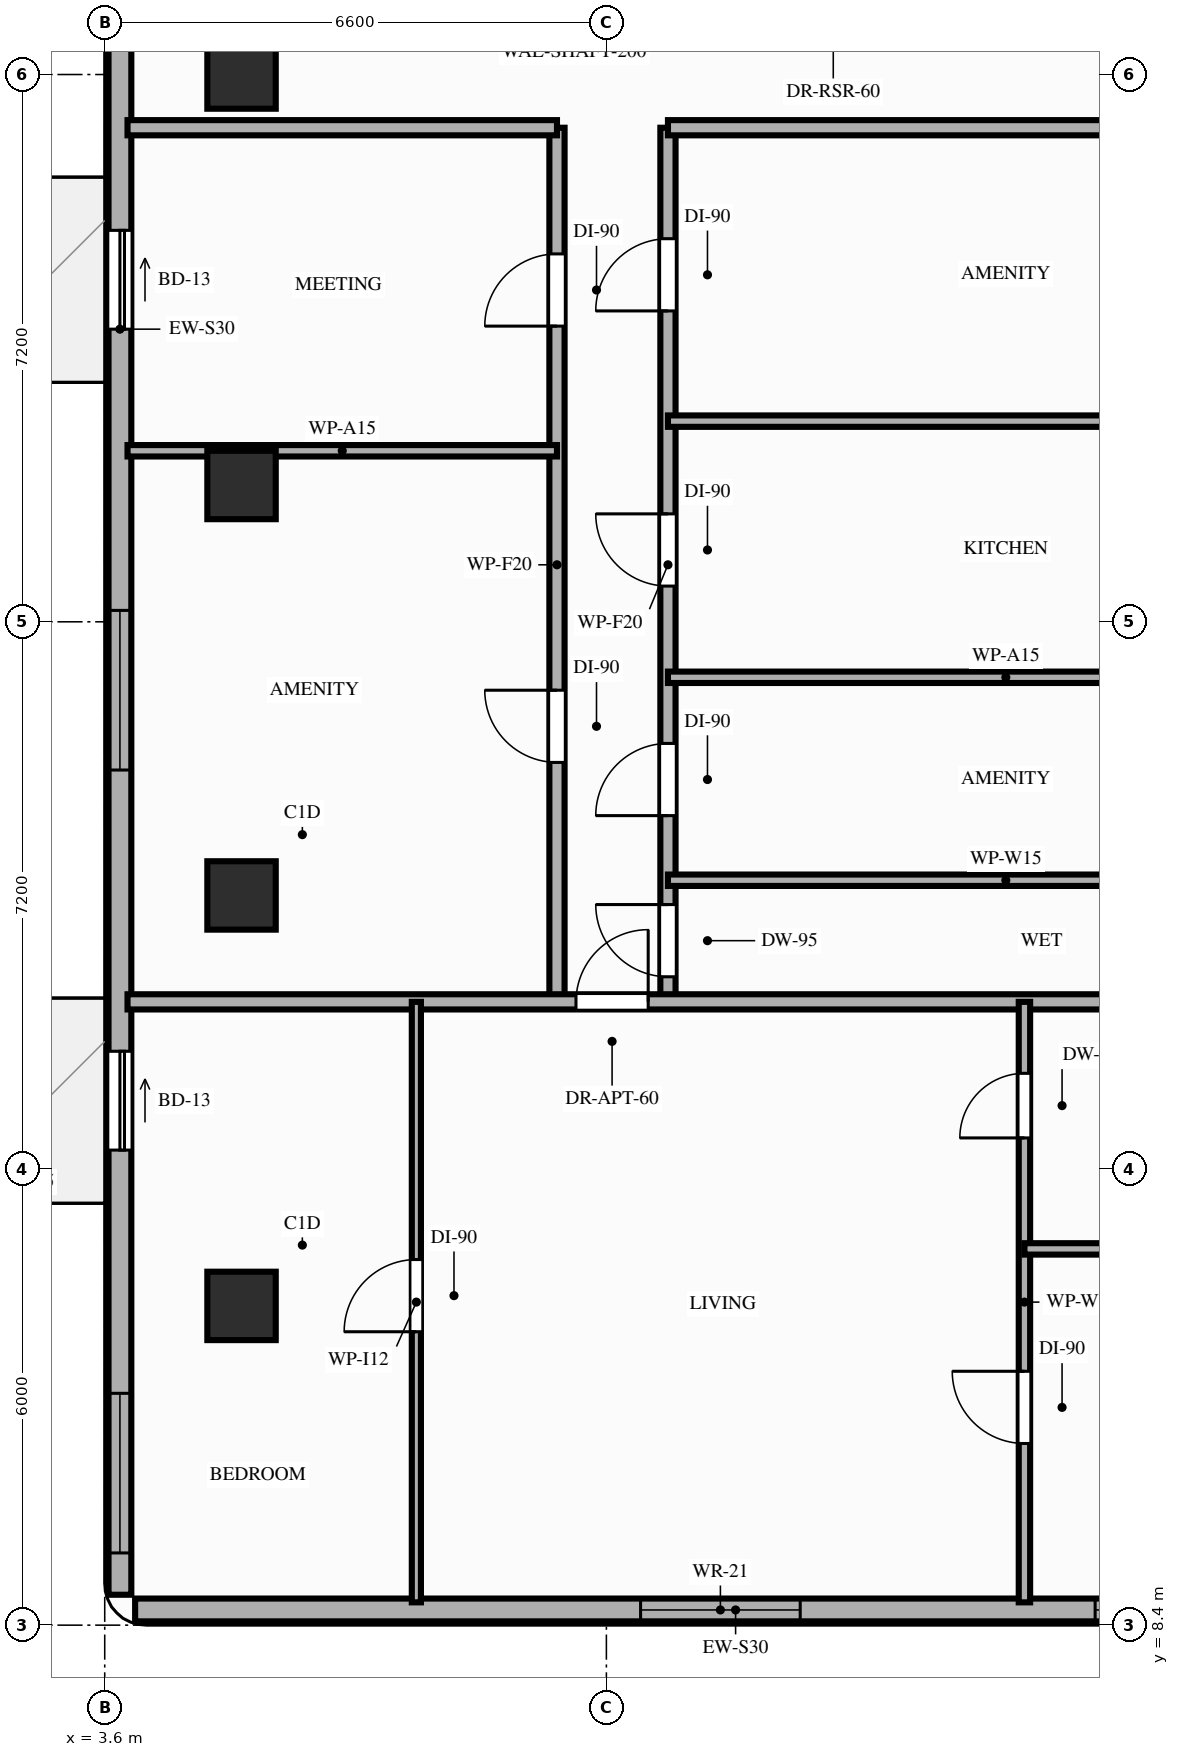
"""IFC4 building model, lengths in metres.
Left out: names, types, materials, properties, quantities, classifications, styles, units other than length and angle.
Written with IfcOpenShell. Run it as: python <this file> out.ifc"""

import sys

from ifc_helpers import new_model, si_unit, direction, frame, frame_2d, origin, origin_2d, place, context, subcontext, project, spatial, rectangle, extrude, element, fill, save


model = new_model("IFC4")
c1 = context("Model", 3, precision=1e-05, world=origin(), true_north=direction((0.0, 1.0)))
c2 = subcontext(c1, "Body", "Model", "MODEL_VIEW")
j1 = project(units=[si_unit("LENGTHUNIT", "METRE"), si_unit("PLANEANGLEUNIT", "RADIAN")], contexts=[c1])
p1 = place(None, origin())
s1 = spatial("IfcSite", under=j1, at=p1, CompositionType="ELEMENT")
p2 = place(p1, origin())
s2 = spatial("IfcBuilding", under=s1, at=p2, CompositionType="ELEMENT")
p3 = place(p2, frame((0.0, 0.0, 182.4)))
s3 = spatial("IfcBuildingStorey", under=s2, at=p3, CompositionType="ELEMENT", Elevation=182.4)
for number, where, z_axis, x_axis in (
    (1, (5.4, 12.6, 0.0), (0.0, 0.0, 1.0), (1.0, 0.0, 0.0)),
    (2, (5.4, 18.0, 0.0), (0.0, 0.0, 1.0), (1.0, 0.0, 0.0)),
    (3, (5.4, 23.4, 0.0), (0.0, 0.0, 1.0), (1.0, 0.0, 0.0)),
    (4, (5.4, 28.8, 0.0), (0.0, 0.0, 1.0), (1.0, 0.0, 0.0)),
):
    element("IfcColumn", number, at=place(p3, frame(where, z_axis=z_axis, x_axis=x_axis)), inside=s3, PredefinedType="COLUMN", context=c2, shape_type="SweptSolid", body=[
        extrude(rectangle(XDim=0.9, YDim=0.9, at=origin_2d()), origin(), (0.0, 0.0, 1.0), 3.2),
    ])
p4 = place(p3, frame((4.0, 8.6, 0.0), z_axis=(0.0, 0.0, 1.0), x_axis=(1.0, 0.0, 0.0)))
e5 = element("IfcWall", 5, at=p4, inside=s3, PredefinedType="STANDARD", context=c2, shape_type="SweptSolid", body=[
    extrude(rectangle(XDim=15.8, YDim=0.3, at=frame_2d((7.9, 0.0))), origin(), (0.0, 0.0, 1.0), 3.02),
])
p5 = place(p4, frame((6.65, 0.0, 0.85)))
e6 = element("IfcOpeningElement", 6, at=p5, cuts=e5, PredefinedType="OPENING", context=c2, shape_type="SweptSolid", body=[
    extrude(rectangle(XDim=2.1, YDim=1.8, at=frame_2d((1.05, 0.9))), frame((0.0, 0.16, 0.0), z_axis=(0.0, -1.0, 0.0), x_axis=(1.0, 0.0, 0.0)), (0.0, 0.0, 1.0), 0.32),
])
p6 = place(p4, frame((12.63, 0.0, 0.85)))
e7 = element("IfcOpeningElement", 7, at=p6, cuts=e5, PredefinedType="OPENING", context=c2, shape_type="SweptSolid", body=[
    extrude(rectangle(XDim=2.1, YDim=1.8, at=frame_2d((1.05, 0.9))), frame((0.0, 0.16, 0.0), z_axis=(0.0, -1.0, 0.0), x_axis=(1.0, 0.0, 0.0)), (0.0, 0.0, 1.0), 0.32),
])
p7 = place(p3, frame((3.8, 42.1, 0.0), z_axis=(0.0, 0.0, 1.0), x_axis=(0.0, -1.0, 0.0)))
e8 = element("IfcWall", 8, at=p7, inside=s3, PredefinedType="STANDARD", context=c2, shape_type="SweptSolid", body=[
    extrude(rectangle(XDim=33.3, YDim=0.3, at=frame_2d((16.65, 0.0))), origin(), (0.0, 0.0, 1.0), 2.71),
])
p8 = place(p7, frame((26.15, 0.0, 0.0)))
e9 = element("IfcOpeningElement", 9, at=p8, cuts=e8, PredefinedType="OPENING", context=c2, shape_type="SweptSolid", body=[
    extrude(rectangle(XDim=1.3, YDim=2.08, at=frame_2d((0.65, 1.04))), frame((0.0, 0.16, 0.0), z_axis=(0.0, -1.0, 0.0), x_axis=(1.0, 0.0, 0.0)), (0.0, 0.0, 1.0), 0.32),
])
p9 = place(p7, frame((15.35, 0.0, 0.0)))
e10 = element("IfcOpeningElement", 10, at=p9, cuts=e8, PredefinedType="OPENING", context=c2, shape_type="SweptSolid", body=[
    extrude(rectangle(XDim=1.3, YDim=2.08, at=frame_2d((0.65, 1.04))), frame((0.0, 0.16, 0.0), z_axis=(0.0, -1.0, 0.0), x_axis=(1.0, 0.0, 0.0)), (0.0, 0.0, 1.0), 0.32),
])
p10 = place(p7, frame((30.65, 0.0, 0.85)))
e11 = element("IfcOpeningElement", 11, at=p10, cuts=e8, PredefinedType="OPENING", context=c2, shape_type="SweptSolid", body=[
    extrude(rectangle(XDim=2.1, YDim=1.61, at=frame_2d((1.05, 0.805))), frame((0.0, 0.16, 0.0), z_axis=(0.0, -1.0, 0.0), x_axis=(1.0, 0.0, 0.0)), (0.0, 0.0, 1.0), 0.32),
])
p11 = place(p7, frame((20.35, 0.0, 0.85)))
e12 = element("IfcOpeningElement", 12, at=p11, cuts=e8, PredefinedType="OPENING", context=c2, shape_type="SweptSolid", body=[
    extrude(rectangle(XDim=2.1, YDim=1.61, at=frame_2d((1.05, 0.805))), frame((0.0, 0.16, 0.0), z_axis=(0.0, -1.0, 0.0), x_axis=(1.0, 0.0, 0.0)), (0.0, 0.0, 1.0), 0.32),
])
p12 = place(p7, frame((9.75, 0.0, 0.85)))
e13 = element("IfcOpeningElement", 13, at=p12, cuts=e8, PredefinedType="OPENING", context=c2, shape_type="SweptSolid", body=[
    extrude(rectangle(XDim=2.1, YDim=1.61, at=frame_2d((1.05, 0.805))), frame((0.0, 0.16, 0.0), z_axis=(0.0, -1.0, 0.0), x_axis=(1.0, 0.0, 0.0)), (0.0, 0.0, 1.0), 0.32),
])
p13 = place(p7, frame((3.65, 0.0, 0.85)))
e14 = element("IfcOpeningElement", 14, at=p13, cuts=e8, PredefinedType="OPENING", context=c2, shape_type="SweptSolid", body=[
    extrude(rectangle(XDim=2.1, YDim=1.61, at=frame_2d((1.05, 0.805))), frame((0.0, 0.16, 0.0), z_axis=(0.0, -1.0, 0.0), x_axis=(1.0, 0.0, 0.0)), (0.0, 0.0, 1.0), 0.32),
])
p14 = place(p3, frame((9.55, 16.6, 0.0), z_axis=(0.0, 0.0, 1.0), x_axis=(0.0, 1.0, 0.0)))
e15 = element("IfcWall", 15, at=p14, inside=s3, PredefinedType="PARTITIONING", context=c2, shape_type="SweptSolid", body=[
    extrude(rectangle(XDim=11.5, YDim=0.2, at=frame_2d((5.75, 0.0))), origin(), (0.0, 0.0, 1.0), 2.45),
])
p15 = place(p14, frame((3.15, 0.0, 0.0)))
e16 = element("IfcOpeningElement", 16, at=p15, cuts=e15, PredefinedType="OPENING", context=c2, shape_type="SweptSolid", body=[
    extrude(rectangle(XDim=0.95, YDim=2.15, at=frame_2d((0.475, 1.075))), frame((0.0, 0.11, 0.0), z_axis=(0.0, -1.0, 0.0), x_axis=(1.0, 0.0, 0.0)), (0.0, 0.0, 1.0), 0.22),
])
p16 = place(p14, frame((8.89, 0.0, 0.0)))
e17 = element("IfcOpeningElement", 17, at=p16, cuts=e15, PredefinedType="OPENING", context=c2, shape_type="SweptSolid", body=[
    extrude(rectangle(XDim=0.95, YDim=2.15, at=frame_2d((0.475, 1.075))), frame((0.0, 0.11, 0.0), z_axis=(0.0, -1.0, 0.0), x_axis=(1.0, 0.0, 0.0)), (0.0, 0.0, 1.0), 0.22),
])
p17 = place(p3, frame((11.01, 16.6, 0.0), z_axis=(0.0, 0.0, 1.0), x_axis=(0.0, 1.0, 0.0)))
e18 = element("IfcWall", 18, at=p17, inside=s3, PredefinedType="PARTITIONING", context=c2, shape_type="SweptSolid", body=[
    extrude(rectangle(XDim=11.5, YDim=0.2, at=frame_2d((5.75, 0.0))), origin(), (0.0, 0.0, 1.0), 2.45),
])
p18 = place(p17, frame((0.33, 0.0, 0.0)))
e19 = element("IfcOpeningElement", 19, at=p18, cuts=e18, PredefinedType="OPENING", context=c2, shape_type="SweptSolid", body=[
    extrude(rectangle(XDim=0.95, YDim=2.1, at=frame_2d((0.475, 1.05))), frame((0.0, 0.11, 0.0), z_axis=(0.0, -1.0, 0.0), x_axis=(1.0, 0.0, 0.0)), (0.0, 0.0, 1.0), 0.22),
])
p19 = place(p17, frame((2.45, 0.0, 0.0)))
e20 = element("IfcOpeningElement", 20, at=p19, cuts=e18, PredefinedType="OPENING", context=c2, shape_type="SweptSolid", body=[
    extrude(rectangle(XDim=0.95, YDim=2.15, at=frame_2d((0.475, 1.075))), frame((0.0, 0.11, 0.0), z_axis=(0.0, -1.0, 0.0), x_axis=(1.0, 0.0, 0.0)), (0.0, 0.0, 1.0), 0.22),
])
p20 = place(p17, frame((5.47, 0.0, 0.0)))
e21 = element("IfcOpeningElement", 21, at=p20, cuts=e18, PredefinedType="OPENING", context=c2, shape_type="SweptSolid", body=[
    extrude(rectangle(XDim=0.95, YDim=2.15, at=frame_2d((0.475, 1.075))), frame((0.0, 0.11, 0.0), z_axis=(0.0, -1.0, 0.0), x_axis=(1.0, 0.0, 0.0)), (0.0, 0.0, 1.0), 0.22),
])
p21 = place(p17, frame((9.09, 0.0, 0.0)))
e22 = element("IfcOpeningElement", 22, at=p21, cuts=e18, PredefinedType="OPENING", context=c2, shape_type="SweptSolid", body=[
    extrude(rectangle(XDim=0.95, YDim=2.15, at=frame_2d((0.475, 1.075))), frame((0.0, 0.11, 0.0), z_axis=(0.0, -1.0, 0.0), x_axis=(1.0, 0.0, 0.0)), (0.0, 0.0, 1.0), 0.22),
])
p22 = place(p3, frame((3.9, 16.6, 0.0), z_axis=(0.0, 0.0, 1.0), x_axis=(1.0, 0.0, 0.0)))
e23 = element("IfcWall", 23, at=p22, inside=s3, PredefinedType="PARTITIONING", context=c2, shape_type="SweptSolid", body=[
    extrude(rectangle(XDim=16.0, YDim=0.2, at=frame_2d((8.0, 0.0))), origin(), (0.0, 0.0, 1.0), 2.45),
])
p23 = place(p22, frame((5.9, 0.0, 0.0)))
e24 = element("IfcOpeningElement", 24, at=p23, cuts=e23, PredefinedType="OPENING", context=c2, shape_type="SweptSolid", body=[
    extrude(rectangle(XDim=0.95, YDim=2.15, at=frame_2d((0.475, 1.075))), frame((0.0, 0.11, 0.0), z_axis=(0.0, -1.0, 0.0), x_axis=(1.0, 0.0, 0.0)), (0.0, 0.0, 1.0), 0.22),
])
p24 = place(p3, frame((3.9, 28.1, 0.0), z_axis=(0.0, 0.0, 1.0), x_axis=(1.0, 0.0, 0.0)))
e25 = element("IfcWall", 25, at=p24, inside=s3, PredefinedType="PARTITIONING", context=c2, shape_type="SweptSolid", body=[
    extrude(rectangle(XDim=5.65, YDim=0.2, at=frame_2d((2.825, 0.0))), origin(), (0.0, 0.0, 1.0), 2.45),
])
p25 = place(p3, frame((11.01, 28.1, 0.0), z_axis=(0.0, 0.0, 1.0), x_axis=(1.0, 0.0, 0.0)))
e26 = element("IfcWall", 26, at=p25, inside=s3, PredefinedType="PARTITIONING", context=c2, shape_type="SweptSolid", body=[
    extrude(rectangle(XDim=8.89, YDim=0.2, at=frame_2d((4.445, 0.0))), origin(), (0.0, 0.0, 1.0), 2.45),
])
p26 = place(p3, frame((7.7, 8.7, 0.0), z_axis=(0.0, 0.0, 1.0), x_axis=(0.0, 1.0, 0.0)))
e27 = element("IfcWall", 27, at=p26, inside=s3, PredefinedType="PARTITIONING", context=c2, shape_type="SweptSolid", body=[
    extrude(rectangle(XDim=7.9, YDim=0.12, at=frame_2d((3.95, 0.0))), origin(), (0.0, 0.0, 1.0), 2.45),
])
p27 = place(p26, frame((3.56, 0.0, 0.0)))
e28 = element("IfcOpeningElement", 28, at=p27, cuts=e27, PredefinedType="OPENING", context=c2, shape_type="SweptSolid", body=[
    extrude(rectangle(XDim=0.95, YDim=2.15, at=frame_2d((0.475, 1.075))), frame((0.0, 0.07, 0.0), z_axis=(0.0, -1.0, 0.0), x_axis=(1.0, 0.0, 0.0)), (0.0, 0.0, 1.0), 0.14),
])
p28 = place(p3, frame((15.7, 8.7, 0.0), z_axis=(0.0, 0.0, 1.0), x_axis=(0.0, 1.0, 0.0)))
e29 = element("IfcWall", 29, at=p28, inside=s3, PredefinedType="PARTITIONING", context=c2, shape_type="SweptSolid", body=[
    extrude(rectangle(XDim=7.9, YDim=0.15, at=frame_2d((3.95, 0.0))), origin(), (0.0, 0.0, 1.0), 2.45),
])
p29 = place(p28, frame((2.09, 0.0, 0.0)))
e30 = element("IfcOpeningElement", 30, at=p29, cuts=e29, PredefinedType="OPENING", context=c2, shape_type="SweptSolid", body=[
    extrude(rectangle(XDim=0.95, YDim=2.15, at=frame_2d((0.475, 1.075))), frame((0.0, 0.085, 0.0), z_axis=(0.0, -1.0, 0.0), x_axis=(1.0, 0.0, 0.0)), (0.0, 0.0, 1.0), 0.17),
])
p30 = place(p28, frame((6.11, 0.0, 0.0)))
e31 = element("IfcOpeningElement", 31, at=p30, cuts=e29, PredefinedType="OPENING", context=c2, shape_type="SweptSolid", body=[
    extrude(rectangle(XDim=0.85, YDim=2.1, at=frame_2d((0.425, 1.05))), frame((0.0, 0.085, 0.0), z_axis=(0.0, -1.0, 0.0), x_axis=(1.0, 0.0, 0.0)), (0.0, 0.0, 1.0), 0.17),
])
p31 = place(p3, frame((15.7, 13.35, 0.0), z_axis=(0.0, 0.0, 1.0), x_axis=(1.0, 0.0, 0.0)))
e32 = element("IfcWall", 32, at=p31, inside=s3, PredefinedType="PARTITIONING", context=c2, shape_type="SweptSolid", body=[
    extrude(rectangle(XDim=4.2, YDim=0.15, at=frame_2d((2.1, 0.0))), origin(), (0.0, 0.0, 1.0), 2.45),
])
p32 = place(p3, frame((3.9, 23.85, 0.0), z_axis=(0.0, 0.0, 1.0), x_axis=(1.0, 0.0, 0.0)))
e33 = element("IfcWall", 33, at=p32, inside=s3, PredefinedType="PARTITIONING", context=c2, shape_type="SweptSolid", body=[
    extrude(rectangle(XDim=5.65, YDim=0.15, at=frame_2d((2.825, 0.0))), origin(), (0.0, 0.0, 1.0), 2.45),
])
for number, where, z_axis, x_axis in (
    (34, (11.01, 18.2, 0.0), (0.0, 0.0, 1.0), (1.0, 0.0, 0.0)),
    (35, (11.01, 20.87, 0.0), (0.0, 0.0, 1.0), (1.0, 0.0, 0.0)),
    (36, (11.01, 24.24, 0.0), (0.0, 0.0, 1.0), (1.0, 0.0, 0.0)),
):
    element("IfcWall", number, at=place(p3, frame(where, z_axis=z_axis, x_axis=x_axis)), inside=s3, PredefinedType="PARTITIONING", context=c2, shape_type="SweptSolid", body=[
        extrude(rectangle(XDim=8.89, YDim=0.15, at=frame_2d((4.445, 0.0))), origin(), (0.0, 0.0, 1.0), 2.45),
    ])
p33 = place(p8, origin())
e37 = element("IfcDoor", 37, at=p33, inside=s3, OperationType="SLIDING_TO_LEFT", PredefinedType="DOOR", context=c2, shape_type="SweptSolid", body=[
    extrude(rectangle(XDim=1.3, YDim=2.08, at=frame_2d((0.65, 1.04))), frame((0.0, 0.025, 0.0), z_axis=(0.0, -1.0, 0.0), x_axis=(1.0, 0.0, 0.0)), (0.0, 0.0, 1.0), 0.05),
])
fill(e9, e37)
p34 = place(p9, origin())
e38 = element("IfcDoor", 38, at=p34, inside=s3, OperationType="SLIDING_TO_LEFT", PredefinedType="DOOR", context=c2, shape_type="SweptSolid", body=[
    extrude(rectangle(XDim=1.3, YDim=2.08, at=frame_2d((0.65, 1.04))), frame((0.0, 0.025, 0.0), z_axis=(0.0, -1.0, 0.0), x_axis=(1.0, 0.0, 0.0)), (0.0, 0.0, 1.0), 0.05),
])
fill(e10, e38)
p35 = place(p5, origin())
e39 = element("IfcWindow", 39, at=p35, inside=s3, PartitioningType="SINGLE_PANEL", PredefinedType="WINDOW", context=c2, shape_type="SweptSolid", body=[
    extrude(rectangle(XDim=2.1, YDim=1.8, at=frame_2d((1.05, 0.9))), frame((0.0, 0.03, 0.0), z_axis=(0.0, -1.0, 0.0), x_axis=(1.0, 0.0, 0.0)), (0.0, 0.0, 1.0), 0.06),
])
fill(e6, e39)
p36 = place(p6, origin())
e40 = element("IfcWindow", 40, at=p36, inside=s3, PartitioningType="SINGLE_PANEL", PredefinedType="WINDOW", context=c2, shape_type="SweptSolid", body=[
    extrude(rectangle(XDim=2.1, YDim=1.8, at=frame_2d((1.05, 0.9))), frame((0.0, 0.03, 0.0), z_axis=(0.0, -1.0, 0.0), x_axis=(1.0, 0.0, 0.0)), (0.0, 0.0, 1.0), 0.06),
])
fill(e7, e40)
p37 = place(p10, origin())
e41 = element("IfcWindow", 41, at=p37, inside=s3, PartitioningType="SINGLE_PANEL", PredefinedType="WINDOW", context=c2, shape_type="SweptSolid", body=[
    extrude(rectangle(XDim=2.1, YDim=1.61, at=frame_2d((1.05, 0.805))), frame((0.0, 0.03, 0.0), z_axis=(0.0, -1.0, 0.0), x_axis=(1.0, 0.0, 0.0)), (0.0, 0.0, 1.0), 0.06),
])
fill(e11, e41)
p38 = place(p11, origin())
e42 = element("IfcWindow", 42, at=p38, inside=s3, PartitioningType="SINGLE_PANEL", PredefinedType="WINDOW", context=c2, shape_type="SweptSolid", body=[
    extrude(rectangle(XDim=2.1, YDim=1.61, at=frame_2d((1.05, 0.805))), frame((0.0, 0.03, 0.0), z_axis=(0.0, -1.0, 0.0), x_axis=(1.0, 0.0, 0.0)), (0.0, 0.0, 1.0), 0.06),
])
fill(e12, e42)
p39 = place(p23, origin())
e43 = element("IfcDoor", 43, at=p39, inside=s3, OperationType="SINGLE_SWING_RIGHT", PredefinedType="DOOR", context=c2, shape_type="SweptSolid", body=[
    extrude(rectangle(XDim=0.95, YDim=2.15, at=frame_2d((0.475, 1.075))), frame((0.0, 0.025, 0.0), z_axis=(0.0, -1.0, 0.0), x_axis=(1.0, 0.0, 0.0)), (0.0, 0.0, 1.0), 0.05),
])
fill(e24, e43)
p40 = place(p27, origin())
e44 = element("IfcDoor", 44, at=p40, inside=s3, OperationType="SINGLE_SWING_LEFT", PredefinedType="DOOR", context=c2, shape_type="SweptSolid", body=[
    extrude(rectangle(XDim=0.95, YDim=2.15, at=frame_2d((0.475, 1.075))), frame((0.0, 0.025, 0.0), z_axis=(0.0, -1.0, 0.0), x_axis=(1.0, 0.0, 0.0)), (0.0, 0.0, 1.0), 0.05),
])
fill(e28, e44)
p41 = place(p29, origin())
e45 = element("IfcDoor", 45, at=p41, inside=s3, OperationType="SINGLE_SWING_RIGHT", PredefinedType="DOOR", context=c2, shape_type="SweptSolid", body=[
    extrude(rectangle(XDim=0.95, YDim=2.15, at=frame_2d((0.475, 1.075))), frame((0.0, 0.025, 0.0), z_axis=(0.0, -1.0, 0.0), x_axis=(1.0, 0.0, 0.0)), (0.0, 0.0, 1.0), 0.05),
])
fill(e30, e45)
p42 = place(p30, origin())
e46 = element("IfcDoor", 46, at=p42, inside=s3, OperationType="SINGLE_SWING_LEFT", PredefinedType="DOOR", context=c2, shape_type="SweptSolid", body=[
    extrude(rectangle(XDim=0.85, YDim=2.1, at=frame_2d((0.425, 1.05))), frame((0.0, 0.025, 0.0), z_axis=(0.0, -1.0, 0.0), x_axis=(1.0, 0.0, 0.0)), (0.0, 0.0, 1.0), 0.05),
])
fill(e31, e46)
p43 = place(p15, origin())
e47 = element("IfcDoor", 47, at=p43, inside=s3, OperationType="SINGLE_SWING_RIGHT", PredefinedType="DOOR", context=c2, shape_type="SweptSolid", body=[
    extrude(rectangle(XDim=0.95, YDim=2.15, at=frame_2d((0.475, 1.075))), frame((0.0, 0.025, 0.0), z_axis=(0.0, -1.0, 0.0), x_axis=(1.0, 0.0, 0.0)), (0.0, 0.0, 1.0), 0.05),
])
fill(e16, e47)
p44 = place(p16, origin())
e48 = element("IfcDoor", 48, at=p44, inside=s3, OperationType="SINGLE_SWING_LEFT", PredefinedType="DOOR", context=c2, shape_type="SweptSolid", body=[
    extrude(rectangle(XDim=0.95, YDim=2.15, at=frame_2d((0.475, 1.075))), frame((0.0, 0.025, 0.0), z_axis=(0.0, -1.0, 0.0), x_axis=(1.0, 0.0, 0.0)), (0.0, 0.0, 1.0), 0.05),
])
fill(e17, e48)
p45 = place(p18, origin())
e49 = element("IfcDoor", 49, at=p45, inside=s3, OperationType="SINGLE_SWING_RIGHT", PredefinedType="DOOR", context=c2, shape_type="SweptSolid", body=[
    extrude(rectangle(XDim=0.95, YDim=2.1, at=frame_2d((0.475, 1.05))), frame((0.0, 0.025, 0.0), z_axis=(0.0, -1.0, 0.0), x_axis=(1.0, 0.0, 0.0)), (0.0, 0.0, 1.0), 0.05),
])
fill(e19, e49)
p46 = place(p19, origin())
e50 = element("IfcDoor", 50, at=p46, inside=s3, OperationType="SINGLE_SWING_LEFT", PredefinedType="DOOR", context=c2, shape_type="SweptSolid", body=[
    extrude(rectangle(XDim=0.95, YDim=2.15, at=frame_2d((0.475, 1.075))), frame((0.0, 0.025, 0.0), z_axis=(0.0, -1.0, 0.0), x_axis=(1.0, 0.0, 0.0)), (0.0, 0.0, 1.0), 0.05),
])
fill(e20, e50)
p47 = place(p20, origin())
e51 = element("IfcDoor", 51, at=p47, inside=s3, OperationType="SINGLE_SWING_RIGHT", PredefinedType="DOOR", context=c2, shape_type="SweptSolid", body=[
    extrude(rectangle(XDim=0.95, YDim=2.15, at=frame_2d((0.475, 1.075))), frame((0.0, 0.025, 0.0), z_axis=(0.0, -1.0, 0.0), x_axis=(1.0, 0.0, 0.0)), (0.0, 0.0, 1.0), 0.05),
])
fill(e21, e51)
p48 = place(p21, origin())
e52 = element("IfcDoor", 52, at=p48, inside=s3, OperationType="SINGLE_SWING_LEFT", PredefinedType="DOOR", context=c2, shape_type="SweptSolid", body=[
    extrude(rectangle(XDim=0.95, YDim=2.15, at=frame_2d((0.475, 1.075))), frame((0.0, 0.025, 0.0), z_axis=(0.0, -1.0, 0.0), x_axis=(1.0, 0.0, 0.0)), (0.0, 0.0, 1.0), 0.05),
])
fill(e22, e52)
save(model, sys.argv[1])
